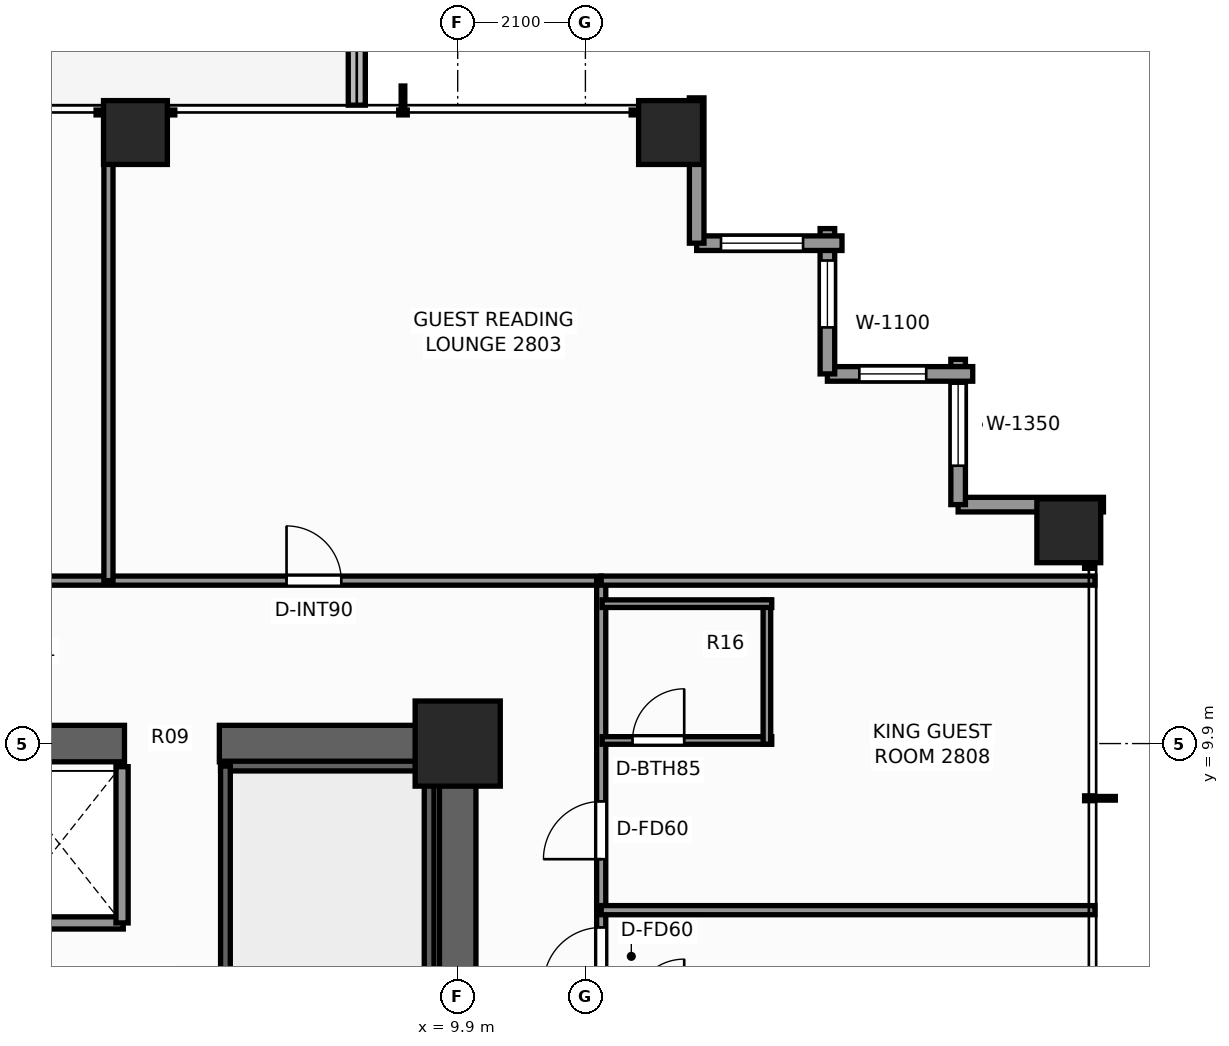
"""IFC4 building model, lengths in metres.
Left out: names, types, materials, properties, quantities, classifications, styles, units other than length and angle.
Written with IfcOpenShell. Run it as: python <this file> out.ifc"""

import sys

from ifc_helpers import new_model, si_unit, direction, frame, frame_2d, origin, origin_2d, place, context, subcontext, project, spatial, rectangle, extrude, element, fill, save


model = new_model("IFC4")
c1 = context("Model", 3, precision=1e-05, world=origin(), true_north=direction((0.0, 1.0)))
c2 = subcontext(c1, "Body", "Model", "MODEL_VIEW")
j1 = project(units=[si_unit("LENGTHUNIT", "METRE"), si_unit("PLANEANGLEUNIT", "RADIAN")], contexts=[c1])
p1 = place(None, origin())
s1 = spatial("IfcSite", under=j1, at=p1, CompositionType="ELEMENT")
p2 = place(p1, origin())
s2 = spatial("IfcBuilding", under=s1, at=p2, CompositionType="ELEMENT")
p3 = place(p2, frame((0.0, 0.0, 98.6)))
s3 = spatial("IfcBuildingStorey", under=s2, at=p3, CompositionType="ELEMENT", Elevation=98.6)
p4 = place(p3, frame((-10.2, 9.9, 0.0), z_axis=(0.0, 0.0, 1.0), x_axis=(1.0, 0.0, 0.0)))
e1 = element("IfcWall", 1, at=p4, inside=s3, PredefinedType="SHEAR", context=c2, shape_type="SweptSolid", body=[
    extrude(rectangle(XDim=14.62, YDim=0.6, at=frame_2d((7.31, 0.0))), origin(), (0.0, 0.0, 1.0), 3.3),
])
p5 = place(p3, frame((5.98, 9.9, 0.0), z_axis=(0.0, 0.0, 1.0), x_axis=(1.0, 0.0, 0.0)))
e2 = element("IfcWall", 2, at=p5, inside=s3, PredefinedType="SHEAR", context=c2, shape_type="SweptSolid", body=[
    extrude(rectangle(XDim=4.22, YDim=0.6, at=frame_2d((2.11, 0.0))), origin(), (0.0, 0.0, 1.0), 3.3),
])
p6 = place(p3, frame((9.9, -3.7, 0.0), z_axis=(0.0, 0.0, 1.0), x_axis=(0.0, 1.0, 0.0)))
e3 = element("IfcWall", 3, at=p6, inside=s3, PredefinedType="SHEAR", context=c2, shape_type="SweptSolid", body=[
    extrude(rectangle(XDim=13.3, YDim=0.6, at=frame_2d((6.65, 0.0))), origin(), (0.0, 0.0, 1.0), 3.3),
])
p7 = place(p6, frame((0.35, 0.0, 0.0)))
e4 = element("IfcOpeningElement", 4, at=p7, cuts=e3, PredefinedType="OPENING", context=c2, shape_type="SweptSolid", body=[
    extrude(rectangle(XDim=1.1, YDim=2.2, at=frame_2d((0.55, 1.1))), frame((0.0, 0.31, 0.0), z_axis=(0.0, -1.0, 0.0), x_axis=(1.0, 0.0, 0.0)), (0.0, 0.0, 1.0), 0.62),
])
p8 = place(p3, frame((9.9, 9.9, 0.0), z_axis=(0.0, 0.0, 1.0), x_axis=(1.0, 0.0, 0.0)))
e5 = element("IfcColumn", 5, at=p8, inside=s3, PredefinedType="COLUMN", context=c2, shape_type="SweptSolid", body=[
    extrude(rectangle(XDim=1.4, YDim=1.4, at=origin_2d()), origin(), (0.0, 0.0, 1.0), 3.3),
])
for number, where, z_axis, x_axis in (
    (6, (4.6, 19.95, 0.0), (0.0, 0.0, 1.0), (1.0, 0.0, 0.0)),
    (7, (13.4, 19.95, 0.0), (0.0, 0.0, 1.0), (1.0, 0.0, 0.0)),
    (8, (19.95, 13.4, 0.0), (0.0, 0.0, 1.0), (1.0, 0.0, 0.0)),
):
    element("IfcColumn", number, at=place(p3, frame(where, z_axis=z_axis, x_axis=x_axis)), inside=s3, PredefinedType="COLUMN", context=c2, shape_type="SweptSolid", body=[
        extrude(rectangle(XDim=1.05, YDim=1.05, at=origin_2d()), origin(), (0.0, 0.0, 1.0), 3.3),
    ])
p9 = place(p3, frame((8.24, 20.4, -0.04), z_axis=(0.0, 0.0, 1.0), x_axis=(0.0, 1.0, 0.0)))
e9 = element("IfcWall", 9, at=p9, inside=s3, PredefinedType="PARAPET", context=c2, shape_type="SweptSolid", body=[
    extrude(rectangle(XDim=2.975, YDim=0.28, at=frame_2d((1.487, 0.0))), origin(), (0.0, 0.0, 1.0), 0.42),
])
p10 = place(p3, frame((18.13, 13.83, 0.0), z_axis=(0.0, 0.0, 1.0), x_axis=(1.0, 0.0, 0.0)))
e10 = element("IfcWall", 10, at=p10, inside=s3, PredefinedType="STANDARD", context=c2, shape_type="SweptSolid", body=[
    extrude(rectangle(XDim=2.39, YDim=0.24, at=frame_2d((1.195, 0.0))), origin(), (0.0, 0.0, 1.0), 2.459),
])
p11 = place(p3, frame((18.13, 16.22, 0.0), z_axis=(0.0, 0.0, 1.0), x_axis=(0.0, -1.0, 0.0)))
e11 = element("IfcWall", 11, at=p11, inside=s3, PredefinedType="STANDARD", context=c2, shape_type="SweptSolid", body=[
    extrude(rectangle(XDim=2.39, YDim=0.24, at=frame_2d((1.195, 0.0))), origin(), (0.0, 0.0, 1.0), 2.459),
])
p12 = place(p11, frame((0.4, 0.0, 0.65)))
e12 = element("IfcOpeningElement", 12, at=p12, cuts=e11, PredefinedType="OPENING", context=c2, shape_type="SweptSolid", body=[
    extrude(rectangle(XDim=1.35, YDim=1.55, at=frame_2d((0.675, 0.775))), frame((0.0, 0.13, 0.0), z_axis=(0.0, -1.0, 0.0), x_axis=(1.0, 0.0, 0.0)), (0.0, 0.0, 1.0), 0.26),
])
p13 = place(p3, frame((15.98, 15.98, 0.0), z_axis=(0.0, 0.0, 1.0), x_axis=(1.0, 0.0, 0.0)))
e13 = element("IfcWall", 13, at=p13, inside=s3, PredefinedType="STANDARD", context=c2, shape_type="SweptSolid", body=[
    extrude(rectangle(XDim=2.39, YDim=0.24, at=frame_2d((1.195, 0.0))), origin(), (0.0, 0.0, 1.0), 2.459),
])
p14 = place(p13, frame((0.525, 0.0, 0.65)))
e14 = element("IfcOpeningElement", 14, at=p14, cuts=e13, PredefinedType="OPENING", context=c2, shape_type="SweptSolid", body=[
    extrude(rectangle(XDim=1.1, YDim=1.45, at=frame_2d((0.55, 0.725))), frame((0.0, 0.13, 0.0), z_axis=(0.0, -1.0, 0.0), x_axis=(1.0, 0.0, 0.0)), (0.0, 0.0, 1.0), 0.26),
])
p15 = place(p3, frame((15.98, 18.37, 0.0), z_axis=(0.0, 0.0, 1.0), x_axis=(0.0, -1.0, 0.0)))
e15 = element("IfcWall", 15, at=p15, inside=s3, PredefinedType="STANDARD", context=c2, shape_type="SweptSolid", body=[
    extrude(rectangle(XDim=2.39, YDim=0.24, at=frame_2d((1.195, 0.0))), origin(), (0.0, 0.0, 1.0), 2.459),
])
p16 = place(p15, frame((0.525, 0.0, 0.65)))
e16 = element("IfcOpeningElement", 16, at=p16, cuts=e15, PredefinedType="OPENING", context=c2, shape_type="SweptSolid", body=[
    extrude(rectangle(XDim=1.1, YDim=1.45, at=frame_2d((0.55, 0.725))), frame((0.0, 0.13, 0.0), z_axis=(0.0, -1.0, 0.0), x_axis=(1.0, 0.0, 0.0)), (0.0, 0.0, 1.0), 0.26),
])
p17 = place(p3, frame((13.83, 18.13, 0.0), z_axis=(0.0, 0.0, 1.0), x_axis=(1.0, 0.0, 0.0)))
e17 = element("IfcWall", 17, at=p17, inside=s3, PredefinedType="STANDARD", context=c2, shape_type="SweptSolid", body=[
    extrude(rectangle(XDim=2.39, YDim=0.24, at=frame_2d((1.195, 0.0))), origin(), (0.0, 0.0, 1.0), 2.459),
])
p18 = place(p17, frame((0.4, 0.0, 0.65)))
e18 = element("IfcOpeningElement", 18, at=p18, cuts=e17, PredefinedType="OPENING", context=c2, shape_type="SweptSolid", body=[
    extrude(rectangle(XDim=1.35, YDim=1.55, at=frame_2d((0.675, 0.775))), frame((0.0, 0.13, 0.0), z_axis=(0.0, -1.0, 0.0), x_axis=(1.0, 0.0, 0.0)), (0.0, 0.0, 1.0), 0.26),
])
p19 = place(p3, frame((13.83, 20.52, 0.0), z_axis=(0.0, 0.0, 1.0), x_axis=(0.0, -1.0, 0.0)))
e19 = element("IfcWall", 19, at=p19, inside=s3, PredefinedType="STANDARD", context=c2, shape_type="SweptSolid", body=[
    extrude(rectangle(XDim=2.39, YDim=0.24, at=frame_2d((1.195, 0.0))), origin(), (0.0, 0.0, 1.0), 2.459),
])
p20 = place(p3, frame((6.0, 9.53, 0.0), z_axis=(0.0, 0.0, 1.0), x_axis=(1.0, 0.0, 0.0)))
e20 = element("IfcWall", 20, at=p20, inside=s3, PredefinedType="SHEAR", context=c2, shape_type="SweptSolid", body=[
    extrude(rectangle(XDim=3.52, YDim=0.16, at=frame_2d((1.76, 0.0))), origin(), (0.0, 0.0, 1.0), 3.3),
])
for number, where, z_axis, x_axis in (
    (21, (6.08, 1.97, 0.0), (0.0, 0.0, 1.0), (0.0, 1.0, 0.0)),
    (22, (9.43, 1.97, 0.0), (0.0, 0.0, 1.0), (0.0, 1.0, 0.0)),
):
    element("IfcWall", number, at=place(p3, frame(where, z_axis=z_axis, x_axis=x_axis)), inside=s3, PredefinedType="SHEAR", context=c2, shape_type="SweptSolid", body=[
        extrude(rectangle(XDim=7.56, YDim=0.16, at=frame_2d((3.78, 0.0))), origin(), (0.0, 0.0, 1.0), 3.3),
    ])
p21 = place(p3, frame((0.22, 6.95, 0.0), z_axis=(0.0, 0.0, 1.0), x_axis=(1.0, 0.0, 0.0)))
e23 = element("IfcWall", 23, at=p21, inside=s3, PredefinedType="SOLIDWALL", context=c2, shape_type="SweptSolid", body=[
    extrude(rectangle(XDim=4.18, YDim=0.2, at=frame_2d((2.09, 0.0))), origin(), (0.0, 0.0, 1.0), 3.08),
])
p22 = place(p3, frame((4.38, 6.95, 0.0), z_axis=(0.0, 0.0, 1.0), x_axis=(0.0, 1.0, 0.0)))
e24 = element("IfcWall", 24, at=p22, inside=s3, PredefinedType="SOLIDWALL", context=c2, shape_type="SweptSolid", body=[
    extrude(rectangle(XDim=2.57, YDim=0.2, at=frame_2d((1.285, 0.0))), origin(), (0.0, 0.0, 1.0), 3.08),
])
p23 = place(p3, frame((-12.26, 12.58, 0.0), z_axis=(0.0, 0.0, 1.0), x_axis=(1.0, 0.0, 0.0)))
e25 = element("IfcWall", 25, at=p23, inside=s3, PredefinedType="PARTITIONING", context=c2, shape_type="SweptSolid", body=[
    extrude(rectangle(XDim=24.52, YDim=0.15, at=frame_2d((12.26, 0.0))), origin(), (0.0, 0.0, 1.0), 2.292),
])
p24 = place(p23, frame((4.275, 0.0, 0.0)))
e26 = element("IfcOpeningElement", 26, at=p24, cuts=e25, PredefinedType="OPENING", context=c2, shape_type="SweptSolid", body=[
    extrude(rectangle(XDim=0.9, YDim=2.06, at=frame_2d((0.45, 1.03))), frame((0.0, 0.085, 0.0), z_axis=(0.0, -1.0, 0.0), x_axis=(1.0, 0.0, 0.0)), (0.0, 0.0, 1.0), 0.17),
])
p25 = place(p23, frame((13.84, 0.0, 0.0)))
e27 = element("IfcOpeningElement", 27, at=p25, cuts=e25, PredefinedType="OPENING", context=c2, shape_type="SweptSolid", body=[
    extrude(rectangle(XDim=0.9, YDim=2.06, at=frame_2d((0.45, 1.03))), frame((0.0, 0.085, 0.0), z_axis=(0.0, -1.0, 0.0), x_axis=(1.0, 0.0, 0.0)), (0.0, 0.0, 1.0), 0.17),
])
p26 = place(p23, frame((19.345, 0.0, 0.0)))
e28 = element("IfcOpeningElement", 28, at=p26, cuts=e25, PredefinedType="OPENING", context=c2, shape_type="SweptSolid", body=[
    extrude(rectangle(XDim=0.9, YDim=2.06, at=frame_2d((0.45, 1.03))), frame((0.0, 0.085, 0.0), z_axis=(0.0, -1.0, 0.0), x_axis=(1.0, 0.0, 0.0)), (0.0, 0.0, 1.0), 0.17),
])
p27 = place(p3, frame((12.26, -12.26, 0.0), z_axis=(0.0, 0.0, 1.0), x_axis=(0.0, 1.0, 0.0)))
e29 = element("IfcWall", 29, at=p27, inside=s3, PredefinedType="PARTITIONING", context=c2, shape_type="SweptSolid", body=[
    extrude(rectangle(XDim=24.84, YDim=0.15, at=frame_2d((12.42, 0.0))), origin(), (0.0, 0.0, 1.0), 2.292),
])
p28 = place(p27, frame((2.944, 0.0, 0.0)))
e30 = element("IfcOpeningElement", 30, at=p28, cuts=e29, PredefinedType="OPENING", context=c2, shape_type="SweptSolid", body=[
    extrude(rectangle(XDim=0.9, YDim=2.06, at=frame_2d((0.45, 1.03))), frame((0.0, 0.085, 0.0), z_axis=(0.0, -1.0, 0.0), x_axis=(1.0, 0.0, 0.0)), (0.0, 0.0, 1.0), 0.17),
])
p29 = place(p27, frame((5.279, 0.0, 0.0)))
e31 = element("IfcOpeningElement", 31, at=p29, cuts=e29, PredefinedType="OPENING", context=c2, shape_type="SweptSolid", body=[
    extrude(rectangle(XDim=0.9, YDim=2.06, at=frame_2d((0.45, 1.03))), frame((0.0, 0.085, 0.0), z_axis=(0.0, -1.0, 0.0), x_axis=(1.0, 0.0, 0.0)), (0.0, 0.0, 1.0), 0.17),
])
p30 = place(p27, frame((10.671, 0.0, 0.0)))
e32 = element("IfcOpeningElement", 32, at=p30, cuts=e29, PredefinedType="OPENING", context=c2, shape_type="SweptSolid", body=[
    extrude(rectangle(XDim=0.95, YDim=2.06, at=frame_2d((0.475, 1.03))), frame((0.0, 0.085, 0.0), z_axis=(0.0, -1.0, 0.0), x_axis=(1.0, 0.0, 0.0)), (0.0, 0.0, 1.0), 0.17),
])
p31 = place(p27, frame((18.186, 0.0, 0.0)))
e33 = element("IfcOpeningElement", 33, at=p31, cuts=e29, PredefinedType="OPENING", context=c2, shape_type="SweptSolid", body=[
    extrude(rectangle(XDim=0.95, YDim=2.06, at=frame_2d((0.475, 1.03))), frame((0.0, 0.085, 0.0), z_axis=(0.0, -1.0, 0.0), x_axis=(1.0, 0.0, 0.0)), (0.0, 0.0, 1.0), 0.17),
])
p32 = place(p27, frame((20.259, 0.0, 0.0)))
e34 = element("IfcOpeningElement", 34, at=p32, cuts=e29, PredefinedType="OPENING", context=c2, shape_type="SweptSolid", body=[
    extrude(rectangle(XDim=0.95, YDim=2.06, at=frame_2d((0.475, 1.03))), frame((0.0, 0.085, 0.0), z_axis=(0.0, -1.0, 0.0), x_axis=(1.0, 0.0, 0.0)), (0.0, 0.0, 1.0), 0.17),
])
p33 = place(p3, frame((12.26, 12.58, 0.0), z_axis=(0.0, 0.0, 1.0), x_axis=(1.0, 0.0, 0.0)))
e35 = element("IfcWall", 35, at=p33, inside=s3, PredefinedType="PARTITIONING", context=c2, shape_type="SweptSolid", body=[
    extrude(rectangle(XDim=8.12, YDim=0.15, at=frame_2d((4.06, 0.0))), origin(), (0.0, 0.0, 1.0), 2.292),
])
p34 = place(p3, frame((4.156, 12.58, 0.0), z_axis=(0.0, 0.0, 1.0), x_axis=(0.0, 1.0, 0.0)))
e36 = element("IfcWall", 36, at=p34, inside=s3, PredefinedType="PARTITIONING", context=c2, shape_type="SweptSolid", body=[
    extrude(rectangle(XDim=7.8, YDim=0.15, at=frame_2d((3.9, 0.0))), origin(), (0.0, 0.0, 1.0), 2.449),
])
p35 = place(p3, frame((12.26, 7.16, 0.0), z_axis=(0.0, 0.0, 1.0), x_axis=(1.0, 0.0, 0.0)))
e37 = element("IfcWall", 37, at=p35, inside=s3, PredefinedType="PARTITIONING", context=c2, shape_type="SweptSolid", body=[
    extrude(rectangle(XDim=8.12, YDim=0.15, at=frame_2d((4.06, 0.0))), origin(), (0.0, 0.0, 1.0), 2.449),
])
p36 = place(p3, frame((12.275, 9.951, 0.0), z_axis=(0.0, 0.0, 1.0), x_axis=(1.0, 0.0, 0.0)))
e38 = element("IfcWall", 38, at=p36, inside=s3, PredefinedType="PARTITIONING", context=c2, shape_type="SweptSolid", body=[
    extrude(rectangle(XDim=2.79, YDim=0.125, at=frame_2d((1.395, 0.0))), origin(), (0.0, 0.0, 1.0), 3.08),
])
p37 = place(p36, frame((0.5, 0.0, 0.0)))
e39 = element("IfcOpeningElement", 39, at=p37, cuts=e38, PredefinedType="OPENING", context=c2, shape_type="SweptSolid", body=[
    extrude(rectangle(XDim=0.85, YDim=2.03, at=frame_2d((0.425, 1.015))), frame((0.0, 0.073, 0.0), z_axis=(0.0, -1.0, 0.0), x_axis=(1.0, 0.0, 0.0)), (0.0, 0.0, 1.0), 0.145),
])
p38 = place(p3, frame((14.985, 9.891, 0.0), z_axis=(0.0, 0.0, 1.0), x_axis=(0.0, 1.0, 0.0)))
e40 = element("IfcWall", 40, at=p38, inside=s3, PredefinedType="PARTITIONING", context=c2, shape_type="SweptSolid", body=[
    extrude(rectangle(XDim=2.37, YDim=0.125, at=frame_2d((1.185, 0.0))), origin(), (0.0, 0.0, 1.0), 2.292),
])
p39 = place(p3, frame((12.275, 12.201, 0.0), z_axis=(0.0, 0.0, 1.0), x_axis=(1.0, 0.0, 0.0)))
e41 = element("IfcWall", 41, at=p39, inside=s3, PredefinedType="PARTITIONING", context=c2, shape_type="SweptSolid", body=[
    extrude(rectangle(XDim=2.79, YDim=0.125, at=frame_2d((1.395, 0.0))), origin(), (0.0, 0.0, 1.0), 3.08),
])
p40 = place(p12, origin())
e42 = element("IfcWindow", 42, at=p40, inside=s3, PartitioningType="SINGLE_PANEL", PredefinedType="WINDOW", context=c2, shape_type="SweptSolid", body=[
    extrude(rectangle(XDim=1.35, YDim=1.55, at=frame_2d((0.675, 0.775))), frame((0.0, 0.03, 0.0), z_axis=(0.0, -1.0, 0.0), x_axis=(1.0, 0.0, 0.0)), (0.0, 0.0, 1.0), 0.06),
])
fill(e12, e42)
p41 = place(p14, origin())
e43 = element("IfcWindow", 43, at=p41, inside=s3, PartitioningType="SINGLE_PANEL", PredefinedType="WINDOW", context=c2, shape_type="SweptSolid", body=[
    extrude(rectangle(XDim=1.1, YDim=1.45, at=frame_2d((0.55, 0.725))), frame((0.0, 0.03, 0.0), z_axis=(0.0, -1.0, 0.0), x_axis=(1.0, 0.0, 0.0)), (0.0, 0.0, 1.0), 0.06),
])
fill(e14, e43)
p42 = place(p16, origin())
e44 = element("IfcWindow", 44, at=p42, inside=s3, PartitioningType="SINGLE_PANEL", PredefinedType="WINDOW", context=c2, shape_type="SweptSolid", body=[
    extrude(rectangle(XDim=1.1, YDim=1.45, at=frame_2d((0.55, 0.725))), frame((0.0, 0.03, 0.0), z_axis=(0.0, -1.0, 0.0), x_axis=(1.0, 0.0, 0.0)), (0.0, 0.0, 1.0), 0.06),
])
fill(e16, e44)
p43 = place(p18, origin())
e45 = element("IfcWindow", 45, at=p43, inside=s3, PartitioningType="SINGLE_PANEL", PredefinedType="WINDOW", context=c2, shape_type="SweptSolid", body=[
    extrude(rectangle(XDim=1.35, YDim=1.55, at=frame_2d((0.675, 0.775))), frame((0.0, 0.03, 0.0), z_axis=(0.0, -1.0, 0.0), x_axis=(1.0, 0.0, 0.0)), (0.0, 0.0, 1.0), 0.06),
])
fill(e18, e45)
p44 = place(p26, origin())
e46 = element("IfcDoor", 46, at=p44, inside=s3, OperationType="SINGLE_SWING_LEFT", PredefinedType="DOOR", context=c2, shape_type="SweptSolid", body=[
    extrude(rectangle(XDim=0.9, YDim=2.06, at=frame_2d((0.45, 1.03))), frame((0.0, 0.025, 0.0), z_axis=(0.0, -1.0, 0.0), x_axis=(1.0, 0.0, 0.0)), (0.0, 0.0, 1.0), 0.05),
])
fill(e28, e46)
p45 = place(p31, origin())
e47 = element("IfcDoor", 47, at=p45, inside=s3, OperationType="SINGLE_SWING_LEFT", PredefinedType="DOOR", context=c2, shape_type="SweptSolid", body=[
    extrude(rectangle(XDim=0.95, YDim=2.06, at=frame_2d((0.475, 1.03))), frame((0.0, 0.025, 0.0), z_axis=(0.0, -1.0, 0.0), x_axis=(1.0, 0.0, 0.0)), (0.0, 0.0, 1.0), 0.05),
])
fill(e33, e47)
p46 = place(p37, origin())
e48 = element("IfcDoor", 48, at=p46, inside=s3, OperationType="SINGLE_SWING_RIGHT", PredefinedType="DOOR", context=c2, shape_type="SweptSolid", body=[
    extrude(rectangle(XDim=0.85, YDim=2.03, at=frame_2d((0.425, 1.015))), frame((0.0, 0.025, 0.0), z_axis=(0.0, -1.0, 0.0), x_axis=(1.0, 0.0, 0.0)), (0.0, 0.0, 1.0), 0.05),
])
fill(e39, e48)
p47 = place(p32, origin())
e49 = element("IfcDoor", 49, at=p47, inside=s3, OperationType="SINGLE_SWING_LEFT", PredefinedType="DOOR", context=c2, shape_type="SweptSolid", body=[
    extrude(rectangle(XDim=0.95, YDim=2.06, at=frame_2d((0.475, 1.03))), frame((0.0, 0.025, 0.0), z_axis=(0.0, -1.0, 0.0), x_axis=(1.0, 0.0, 0.0)), (0.0, 0.0, 1.0), 0.05),
])
fill(e34, e49)
save(model, sys.argv[1])
